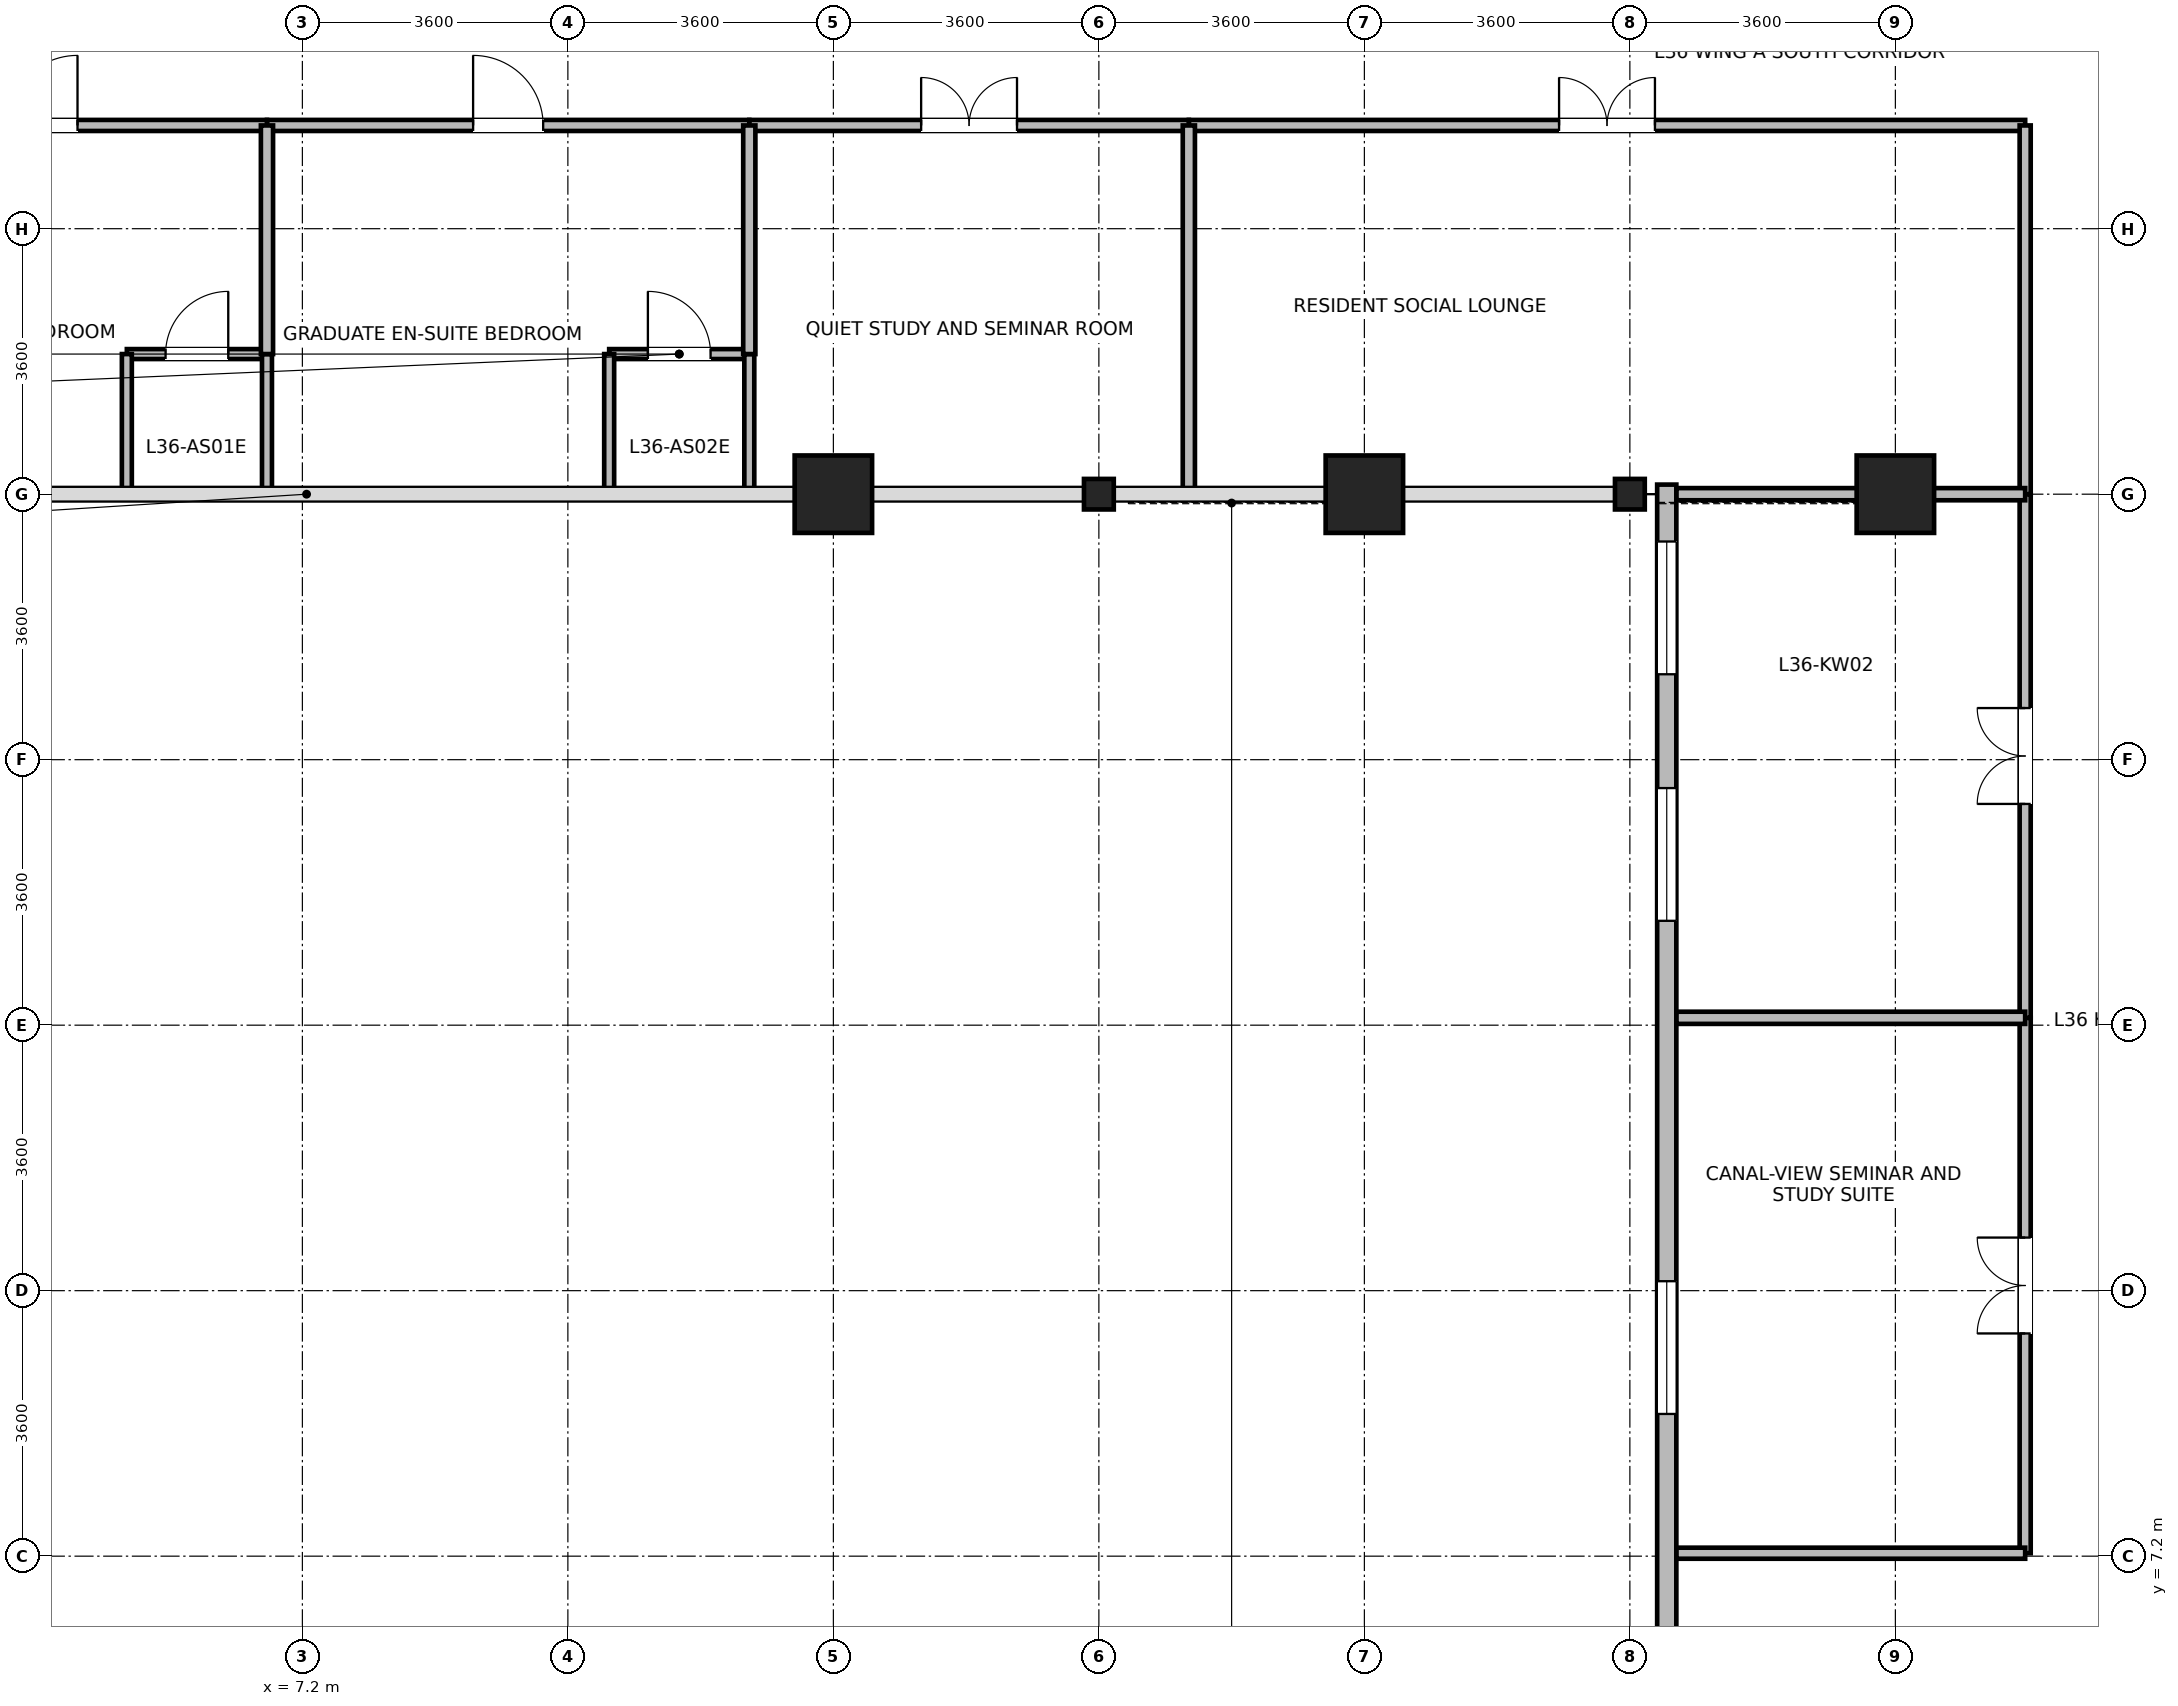
"""IFC4 building model, lengths in metres.
Left out: names, types, materials, properties, quantities, classifications, styles, units other than length and angle.
Written with IfcOpenShell. Run it as: python <this file> out.ifc"""

import sys

from ifc_helpers import new_model, si_unit, direction, frame, frame_2d, origin, origin_2d, place, context, subcontext, project, spatial, rectangle, i_section, extrude, source, transform, mapped, element, fill, save


model = new_model("IFC4")
c1 = context("Model", 3, precision=1e-05, world=origin(), true_north=direction((0.0, 1.0)))
c2 = subcontext(c1, "Body", "Model", "MODEL_VIEW")
j1 = project(units=[si_unit("LENGTHUNIT", "METRE"), si_unit("PLANEANGLEUNIT", "RADIAN")], contexts=[c1])
p1 = place(None, origin())
s1 = spatial("IfcSite", under=j1, at=p1, CompositionType="ELEMENT")
p2 = place(p1, origin())
s2 = spatial("IfcBuilding", under=s1, at=p2, CompositionType="ELEMENT")
p3 = place(p2, frame((0.0, 0.0, 143.9)))
s3 = spatial("IfcBuildingStorey", under=s2, at=p3, CompositionType="ELEMENT", Elevation=143.9)
m1 = source(origin(), c2, "Body", "SweptSolid", [
    extrude(rectangle(XDim=1.05, YDim=1.05, at=origin_2d()), origin(), (0.0, 0.0, 1.0), 3.7),
])
for number, where, z_axis, x_axis in (
    (1, (14.4, 21.6, 0.0), (0.0, 0.0, 1.0), (1.0, 0.0, 0.0)),
    (2, (21.6, 21.6, 0.0), (0.0, 0.0, 1.0), (1.0, 0.0, 0.0)),
    (3, (28.8, 21.6, 0.0), (0.0, 0.0, 1.0), (1.0, 0.0, 0.0)),
):
    element("IfcColumn", number, at=place(p3, frame(where, z_axis=z_axis, x_axis=x_axis)), inside=s3, PredefinedType="COLUMN", context=c2, shape_type="MappedRepresentation", body=[
        mapped(m1, transform((0.0, 0.0, 0.0), x_axis=(1.0, 0.0, 0.0), y_axis=(0.0, 1.0, 0.0), z_axis=(0.0, 0.0, 1.0), scale=1.0)),
    ])
m2 = source(origin(), c2, "Body", "SweptSolid", [
    extrude(i_section(OverallWidth=0.404, OverallDepth=0.414, WebThickness=0.021, FlangeThickness=0.028, FilletRadius=0.015, at=origin_2d()), origin(), (0.0, 0.0, 1.0), 3.7),
])
for number, where, z_axis, x_axis in (
    (4, (18.0, 21.6, 0.0), (0.0, 0.0, 1.0), (1.0, 0.0, 0.0)),
    (5, (25.2, 21.6, 0.0), (0.0, 0.0, 1.0), (1.0, 0.0, 0.0)),
):
    element("IfcColumn", number, at=place(p3, frame(where, z_axis=z_axis, x_axis=x_axis)), inside=s3, PredefinedType="COLUMN", context=c2, shape_type="MappedRepresentation", body=[
        mapped(m2, transform((0.0, 0.0, 0.0), x_axis=(1.0, 0.0, 0.0), y_axis=(0.0, 1.0, 0.0), z_axis=(0.0, 0.0, 1.0), scale=1.0)),
    ])
p4 = place(p3, frame((25.7, 1.67, 0.0), z_axis=(0.0, 0.0, 1.0), x_axis=(0.0, 1.0, 0.0)))
e6 = element("IfcWall", 6, at=p4, inside=s3, PredefinedType="STANDARD", context=c2, shape_type="SweptSolid", body=[
    extrude(rectangle(XDim=20.06, YDim=0.26, at=frame_2d((10.03, 0.0))), origin(), (0.0, 0.0, 1.0), 3.44),
])
p5 = place(p4, frame((0.772, 0.0, 0.85)))
e7 = element("IfcOpeningElement", 7, at=p5, cuts=e6, PredefinedType="OPENING", context=c2, shape_type="SweptSolid", body=[
    extrude(rectangle(XDim=1.8, YDim=1.85, at=frame_2d((0.9, 0.925))), frame((0.0, 0.14, 0.0), z_axis=(0.0, -1.0, 0.0), x_axis=(1.0, 0.0, 0.0)), (0.0, 0.0, 1.0), 0.28),
])
p6 = place(p4, frame((7.458, 0.0, 0.85)))
e8 = element("IfcOpeningElement", 8, at=p6, cuts=e6, PredefinedType="OPENING", context=c2, shape_type="SweptSolid", body=[
    extrude(rectangle(XDim=1.8, YDim=1.85, at=frame_2d((0.9, 0.925))), frame((0.0, 0.14, 0.0), z_axis=(0.0, -1.0, 0.0), x_axis=(1.0, 0.0, 0.0)), (0.0, 0.0, 1.0), 0.28),
])
p7 = place(p4, frame((14.145, 0.0, 0.85)))
e9 = element("IfcOpeningElement", 9, at=p7, cuts=e6, PredefinedType="OPENING", context=c2, shape_type="SweptSolid", body=[
    extrude(rectangle(XDim=1.8, YDim=1.85, at=frame_2d((0.9, 0.925))), frame((0.0, 0.14, 0.0), z_axis=(0.0, -1.0, 0.0), x_axis=(1.0, 0.0, 0.0)), (0.0, 0.0, 1.0), 0.28),
])
p8 = place(p4, frame((17.488, 0.0, 0.85)))
e10 = element("IfcOpeningElement", 10, at=p8, cuts=e6, PredefinedType="OPENING", context=c2, shape_type="SweptSolid", body=[
    extrude(rectangle(XDim=1.8, YDim=1.85, at=frame_2d((0.9, 0.925))), frame((0.0, 0.14, 0.0), z_axis=(0.0, -1.0, 0.0), x_axis=(1.0, 0.0, 0.0)), (0.0, 0.0, 1.0), 0.28),
])
p9 = place(p3, frame((11.36, 23.5, 0.0), z_axis=(0.0, 0.0, 1.0), x_axis=(1.0, 0.0, 0.0)))
e11 = element("IfcWall", 11, at=p9, inside=s3, PredefinedType="PARTITIONING", context=c2, shape_type="SweptSolid", body=[
    extrude(rectangle(XDim=1.9, YDim=0.135, at=frame_2d((0.95, 0.0))), origin(), (0.0, 0.0, 1.0), 3.44),
])
p10 = place(p9, frame((0.525, 0.0, 0.0)))
e12 = element("IfcOpeningElement", 12, at=p10, cuts=e11, PredefinedType="OPENING", context=c2, shape_type="SweptSolid", body=[
    extrude(rectangle(XDim=0.85, YDim=2.04, at=frame_2d((0.425, 1.02))), frame((0.0, 0.078, 0.0), z_axis=(0.0, -1.0, 0.0), x_axis=(1.0, 0.0, 0.0)), (0.0, 0.0, 1.0), 0.155),
])
p11 = place(p3, frame((4.82, 23.5, 0.0), z_axis=(0.0, 0.0, 1.0), x_axis=(1.0, 0.0, 0.0)))
e13 = element("IfcWall", 13, at=p11, inside=s3, PredefinedType="PARTITIONING", context=c2, shape_type="SweptSolid", body=[
    extrude(rectangle(XDim=1.9, YDim=0.135, at=frame_2d((0.95, 0.0))), origin(), (0.0, 0.0, 1.0), 3.44),
])
p12 = place(p11, frame((0.525, 0.0, 0.0)))
e14 = element("IfcOpeningElement", 14, at=p12, cuts=e13, PredefinedType="OPENING", context=c2, shape_type="SweptSolid", body=[
    extrude(rectangle(XDim=0.85, YDim=2.04, at=frame_2d((0.425, 1.02))), frame((0.0, 0.078, 0.0), z_axis=(0.0, -1.0, 0.0), x_axis=(1.0, 0.0, 0.0)), (0.0, 0.0, 1.0), 0.155),
])
for number, where, z_axis, x_axis in (
    (15, (4.82, 21.62, 0.0), (0.0, 0.0, 1.0), (0.0, 1.0, 0.0)),
    (16, (6.72, 21.62, 0.0), (0.0, 0.0, 1.0), (0.0, 1.0, 0.0)),
    (17, (11.36, 21.62, 0.0), (0.0, 0.0, 1.0), (0.0, 1.0, 0.0)),
    (18, (13.26, 21.62, 0.0), (0.0, 0.0, 1.0), (0.0, 1.0, 0.0)),
):
    element("IfcWall", number, at=place(p3, frame(where, z_axis=z_axis, x_axis=x_axis)), inside=s3, PredefinedType="PARTITIONING", context=c2, shape_type="SweptSolid", body=[
        extrude(rectangle(XDim=1.88, YDim=0.135, at=frame_2d((0.94, 0.0))), origin(), (0.0, 0.0, 1.0), 3.44),
    ])
p13 = place(p3, frame((19.22, 26.6, 0.0), z_axis=(0.0, 0.0, 1.0), x_axis=(1.0, 0.0, 0.0)))
e19 = element("IfcWall", 19, at=p13, inside=s3, PredefinedType="PARTITIONING", context=c2, shape_type="SweptSolid", body=[
    extrude(rectangle(XDim=11.34, YDim=0.15, at=frame_2d((5.67, 0.0))), origin(), (0.0, 0.0, 1.0), 3.44),
])
p14 = place(p13, frame((5.02, 0.0, 0.0)))
e20 = element("IfcOpeningElement", 20, at=p14, cuts=e19, PredefinedType="OPENING", context=c2, shape_type="SweptSolid", body=[
    extrude(rectangle(XDim=1.3, YDim=2.12, at=frame_2d((0.65, 1.06))), frame((0.0, 0.085, 0.0), z_axis=(0.0, -1.0, 0.0), x_axis=(1.0, 0.0, 0.0)), (0.0, 0.0, 1.0), 0.17),
])
p15 = place(p3, frame((30.56, 7.24, 0.0), z_axis=(0.0, 0.0, 1.0), x_axis=(0.0, 1.0, 0.0)))
e21 = element("IfcWall", 21, at=p15, inside=s3, PredefinedType="PARTITIONING", context=c2, shape_type="SweptSolid", body=[
    extrude(rectangle(XDim=7.26, YDim=0.15, at=frame_2d((3.63, 0.0))), origin(), (0.0, 0.0, 1.0), 3.44),
])
p16 = place(p15, frame((2.98, 0.0, 0.0)))
e22 = element("IfcOpeningElement", 22, at=p16, cuts=e21, PredefinedType="OPENING", context=c2, shape_type="SweptSolid", body=[
    extrude(rectangle(XDim=1.3, YDim=2.12, at=frame_2d((0.65, 1.06))), frame((0.0, 0.085, 0.0), z_axis=(0.0, -1.0, 0.0), x_axis=(1.0, 0.0, 0.0)), (0.0, 0.0, 1.0), 0.17),
])
p17 = place(p3, frame((30.56, 14.5, 0.0), z_axis=(0.0, 0.0, 1.0), x_axis=(0.0, 1.0, 0.0)))
e23 = element("IfcWall", 23, at=p17, inside=s3, PredefinedType="PARTITIONING", context=c2, shape_type="SweptSolid", body=[
    extrude(rectangle(XDim=7.1, YDim=0.15, at=frame_2d((3.55, 0.0))), origin(), (0.0, 0.0, 1.0), 3.44),
])
p18 = place(p17, frame((2.9, 0.0, 0.0)))
e24 = element("IfcOpeningElement", 24, at=p18, cuts=e23, PredefinedType="OPENING", context=c2, shape_type="SweptSolid", body=[
    extrude(rectangle(XDim=1.3, YDim=2.12, at=frame_2d((0.65, 1.06))), frame((0.0, 0.085, 0.0), z_axis=(0.0, -1.0, 0.0), x_axis=(1.0, 0.0, 0.0)), (0.0, 0.0, 1.0), 0.17),
])
p19 = place(p3, frame((6.72, 26.6, 0.0), z_axis=(0.0, 0.0, 1.0), x_axis=(1.0, 0.0, 0.0)))
e25 = element("IfcWall", 25, at=p19, inside=s3, PredefinedType="PARTITIONING", context=c2, shape_type="SweptSolid", body=[
    extrude(rectangle(XDim=6.54, YDim=0.15, at=frame_2d((3.27, 0.0))), origin(), (0.0, 0.0, 1.0), 3.44),
])
p20 = place(p19, frame((2.795, 0.0, 0.0)))
e26 = element("IfcOpeningElement", 26, at=p20, cuts=e25, PredefinedType="OPENING", context=c2, shape_type="SweptSolid", body=[
    extrude(rectangle(XDim=0.95, YDim=2.1, at=frame_2d((0.475, 1.05))), frame((0.0, 0.085, 0.0), z_axis=(0.0, -1.0, 0.0), x_axis=(1.0, 0.0, 0.0)), (0.0, 0.0, 1.0), 0.17),
])
p21 = place(p3, frame((0.632, 26.6, 0.0), z_axis=(0.0, 0.0, 1.0), x_axis=(1.0, 0.0, 0.0)))
e27 = element("IfcWall", 27, at=p21, inside=s3, PredefinedType="PARTITIONING", context=c2, shape_type="SweptSolid", body=[
    extrude(rectangle(XDim=6.088, YDim=0.15, at=frame_2d((3.044, 0.0))), origin(), (0.0, 0.0, 1.0), 3.44),
])
p22 = place(p21, frame((2.569, 0.0, 0.0)))
e28 = element("IfcOpeningElement", 28, at=p22, cuts=e27, PredefinedType="OPENING", context=c2, shape_type="SweptSolid", body=[
    extrude(rectangle(XDim=0.95, YDim=2.1, at=frame_2d((0.475, 1.05))), frame((0.0, 0.085, 0.0), z_axis=(0.0, -1.0, 0.0), x_axis=(1.0, 0.0, 0.0)), (0.0, 0.0, 1.0), 0.17),
])
p23 = place(p3, frame((13.26, 26.6, 0.0), z_axis=(0.0, 0.0, 1.0), x_axis=(1.0, 0.0, 0.0)))
e29 = element("IfcWall", 29, at=p23, inside=s3, PredefinedType="PARTITIONING", context=c2, shape_type="SweptSolid", body=[
    extrude(rectangle(XDim=5.96, YDim=0.15, at=frame_2d((2.98, 0.0))), origin(), (0.0, 0.0, 1.0), 3.44),
])
p24 = place(p23, frame((2.33, 0.0, 0.0)))
e30 = element("IfcOpeningElement", 30, at=p24, cuts=e29, PredefinedType="OPENING", context=c2, shape_type="SweptSolid", body=[
    extrude(rectangle(XDim=1.3, YDim=2.12, at=frame_2d((0.65, 1.06))), frame((0.0, 0.085, 0.0), z_axis=(0.0, -1.0, 0.0), x_axis=(1.0, 0.0, 0.0)), (0.0, 0.0, 1.0), 0.17),
])
p25 = place(p3, frame((30.56, 21.6, 0.0), z_axis=(0.0, 0.0, 1.0), x_axis=(0.0, 1.0, 0.0)))
e31 = element("IfcWall", 31, at=p25, inside=s3, PredefinedType="PARTITIONING", context=c2, shape_type="SweptSolid", body=[
    extrude(rectangle(XDim=5.0, YDim=0.15, at=frame_2d((2.5, 0.0))), origin(), (0.0, 0.0, 1.0), 3.44),
])
p26 = place(p3, frame((25.832, 7.24, 0.0), z_axis=(0.0, 0.0, 1.0), x_axis=(1.0, 0.0, 0.0)))
e32 = element("IfcWall", 32, at=p26, inside=s3, PredefinedType="PARTITIONING", context=c2, shape_type="SweptSolid", body=[
    extrude(rectangle(XDim=4.728, YDim=0.15, at=frame_2d((2.364, 0.0))), origin(), (0.0, 0.0, 1.0), 3.44),
])
p27 = place(p3, frame((19.22, 21.62, 0.0), z_axis=(0.0, 0.0, 1.0), x_axis=(0.0, 1.0, 0.0)))
e33 = element("IfcWall", 33, at=p27, inside=s3, PredefinedType="PARTITIONING", context=c2, shape_type="SweptSolid", body=[
    extrude(rectangle(XDim=4.98, YDim=0.165, at=frame_2d((2.49, 0.0))), origin(), (0.0, 0.0, 1.0), 3.44),
])
p28 = place(p3, frame((25.832, 14.5, 0.0), z_axis=(0.0, 0.0, 1.0), x_axis=(1.0, 0.0, 0.0)))
e34 = element("IfcWall", 34, at=p28, inside=s3, PredefinedType="PARTITIONING", context=c2, shape_type="SweptSolid", body=[
    extrude(rectangle(XDim=4.728, YDim=0.165, at=frame_2d((2.364, 0.0))), origin(), (0.0, 0.0, 1.0), 3.44),
])
p29 = place(p3, frame((25.832, 21.6, 0.0), z_axis=(0.0, 0.0, 1.0), x_axis=(1.0, 0.0, 0.0)))
e35 = element("IfcWall", 35, at=p29, inside=s3, PredefinedType="PARTITIONING", context=c2, shape_type="SweptSolid", body=[
    extrude(rectangle(XDim=4.728, YDim=0.165, at=frame_2d((2.364, 0.0))), origin(), (0.0, 0.0, 1.0), 2.99),
])
for number, where, z_axis, x_axis in (
    (36, (6.72, 23.5, 0.0), (0.0, 0.0, 1.0), (0.0, 1.0, 0.0)),
    (37, (13.26, 23.5, 0.0), (0.0, 0.0, 1.0), (0.0, 1.0, 0.0)),
):
    element("IfcWall", number, at=place(p3, frame(where, z_axis=z_axis, x_axis=x_axis)), inside=s3, PredefinedType="PARTITIONING", context=c2, shape_type="SweptSolid", body=[
        extrude(rectangle(XDim=3.1, YDim=0.165, at=frame_2d((1.55, 0.0))), origin(), (0.0, 0.0, 1.0), 3.44),
    ])
p30 = place(p6, origin())
e38 = element("IfcWindow", 38, at=p30, inside=s3, PartitioningType="SINGLE_PANEL", PredefinedType="WINDOW", context=c2, shape_type="SweptSolid", body=[
    extrude(rectangle(XDim=1.8, YDim=1.85, at=frame_2d((0.9, 0.925))), frame((0.0, 0.03, 0.0), z_axis=(0.0, -1.0, 0.0), x_axis=(1.0, 0.0, 0.0)), (0.0, 0.0, 1.0), 0.06),
])
fill(e8, e38)
p31 = place(p7, origin())
e39 = element("IfcWindow", 39, at=p31, inside=s3, PartitioningType="SINGLE_PANEL", PredefinedType="WINDOW", context=c2, shape_type="SweptSolid", body=[
    extrude(rectangle(XDim=1.8, YDim=1.85, at=frame_2d((0.9, 0.925))), frame((0.0, 0.03, 0.0), z_axis=(0.0, -1.0, 0.0), x_axis=(1.0, 0.0, 0.0)), (0.0, 0.0, 1.0), 0.06),
])
fill(e9, e39)
p32 = place(p8, origin())
e40 = element("IfcWindow", 40, at=p32, inside=s3, PartitioningType="SINGLE_PANEL", PredefinedType="WINDOW", context=c2, shape_type="SweptSolid", body=[
    extrude(rectangle(XDim=1.8, YDim=1.85, at=frame_2d((0.9, 0.925))), frame((0.0, 0.03, 0.0), z_axis=(0.0, -1.0, 0.0), x_axis=(1.0, 0.0, 0.0)), (0.0, 0.0, 1.0), 0.06),
])
fill(e10, e40)
p33 = place(p10, origin())
e41 = element("IfcDoor", 41, at=p33, inside=s3, OperationType="SINGLE_SWING_LEFT", PredefinedType="DOOR", context=c2, shape_type="SweptSolid", body=[
    extrude(rectangle(XDim=0.85, YDim=2.04, at=frame_2d((0.425, 1.02))), frame((0.0, 0.025, 0.0), z_axis=(0.0, -1.0, 0.0), x_axis=(1.0, 0.0, 0.0)), (0.0, 0.0, 1.0), 0.05),
])
fill(e12, e41)
p34 = place(p12, origin())
e42 = element("IfcDoor", 42, at=p34, inside=s3, OperationType="SINGLE_SWING_RIGHT", PredefinedType="DOOR", context=c2, shape_type="SweptSolid", body=[
    extrude(rectangle(XDim=0.85, YDim=2.04, at=frame_2d((0.425, 1.02))), frame((0.0, 0.025, 0.0), z_axis=(0.0, -1.0, 0.0), x_axis=(1.0, 0.0, 0.0)), (0.0, 0.0, 1.0), 0.05),
])
fill(e14, e42)
p35 = place(p14, origin())
e43 = element("IfcDoor", 43, at=p35, inside=s3, OperationType="DOUBLE_DOOR_SINGLE_SWING", PredefinedType="DOOR", context=c2, shape_type="SweptSolid", body=[
    extrude(rectangle(XDim=1.3, YDim=2.12, at=frame_2d((0.65, 1.06))), frame((0.0, 0.025, 0.0), z_axis=(0.0, -1.0, 0.0), x_axis=(1.0, 0.0, 0.0)), (0.0, 0.0, 1.0), 0.05),
])
fill(e20, e43)
p36 = place(p16, origin())
e44 = element("IfcDoor", 44, at=p36, inside=s3, OperationType="DOUBLE_DOOR_SINGLE_SWING", PredefinedType="DOOR", context=c2, shape_type="SweptSolid", body=[
    extrude(rectangle(XDim=1.3, YDim=2.12, at=frame_2d((0.65, 1.06))), frame((0.0, 0.025, 0.0), z_axis=(0.0, -1.0, 0.0), x_axis=(1.0, 0.0, 0.0)), (0.0, 0.0, 1.0), 0.05),
])
fill(e22, e44)
p37 = place(p18, origin())
e45 = element("IfcDoor", 45, at=p37, inside=s3, OperationType="DOUBLE_DOOR_SINGLE_SWING", PredefinedType="DOOR", context=c2, shape_type="SweptSolid", body=[
    extrude(rectangle(XDim=1.3, YDim=2.12, at=frame_2d((0.65, 1.06))), frame((0.0, 0.025, 0.0), z_axis=(0.0, -1.0, 0.0), x_axis=(1.0, 0.0, 0.0)), (0.0, 0.0, 1.0), 0.05),
])
fill(e24, e45)
p38 = place(p20, origin())
e46 = element("IfcDoor", 46, at=p38, inside=s3, OperationType="SINGLE_SWING_LEFT", PredefinedType="DOOR", context=c2, shape_type="SweptSolid", body=[
    extrude(rectangle(XDim=0.95, YDim=2.1, at=frame_2d((0.475, 1.05))), frame((0.0, 0.025, 0.0), z_axis=(0.0, -1.0, 0.0), x_axis=(1.0, 0.0, 0.0)), (0.0, 0.0, 1.0), 0.05),
])
fill(e26, e46)
p39 = place(p22, origin())
e47 = element("IfcDoor", 47, at=p39, inside=s3, OperationType="SINGLE_SWING_RIGHT", PredefinedType="DOOR", context=c2, shape_type="SweptSolid", body=[
    extrude(rectangle(XDim=0.95, YDim=2.1, at=frame_2d((0.475, 1.05))), frame((0.0, 0.025, 0.0), z_axis=(0.0, -1.0, 0.0), x_axis=(1.0, 0.0, 0.0)), (0.0, 0.0, 1.0), 0.05),
])
fill(e28, e47)
p40 = place(p24, origin())
e48 = element("IfcDoor", 48, at=p40, inside=s3, OperationType="DOUBLE_DOOR_SINGLE_SWING", PredefinedType="DOOR", context=c2, shape_type="SweptSolid", body=[
    extrude(rectangle(XDim=1.3, YDim=2.12, at=frame_2d((0.65, 1.06))), frame((0.0, 0.025, 0.0), z_axis=(0.0, -1.0, 0.0), x_axis=(1.0, 0.0, 0.0)), (0.0, 0.0, 1.0), 0.05),
])
fill(e30, e48)
save(model, sys.argv[1])
